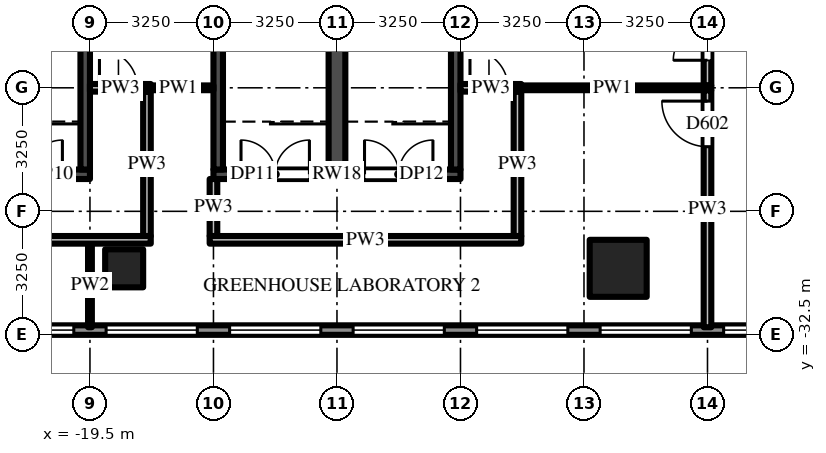
"""IFC4 building model, lengths in metres.
Left out: names, types, materials, properties, quantities, classifications, styles, units other than length and angle.
Written with IfcOpenShell. Run it as: python <this file> out.ifc"""

import sys

from ifc_helpers import new_model, si_unit, direction, frame, frame_2d, origin, origin_2d, place, context, subcontext, project, spatial, rectangle, extrude, source, transform, mapped, element, fill, save


model = new_model("IFC4")
c1 = context("Model", 3, precision=1e-05, world=origin(), true_north=direction((0.0, 1.0)))
c2 = subcontext(c1, "Body", "Model", "MODEL_VIEW")
j1 = project(units=[si_unit("LENGTHUNIT", "METRE"), si_unit("PLANEANGLEUNIT", "RADIAN")], contexts=[c1])
p1 = place(None, origin())
s1 = spatial("IfcSite", under=j1, at=p1, CompositionType="ELEMENT")
p2 = place(p1, origin())
s2 = spatial("IfcBuilding", under=s1, at=p2, CompositionType="ELEMENT")
p3 = place(p2, frame((0.0, 0.0, 29.0)))
s3 = spatial("IfcBuildingStorey", under=s2, at=p3, CompositionType="ELEMENT", Elevation=29.0)
m1 = source(origin(), c2, "Body", "SweptSolid", [
    extrude(rectangle(XDim=1.5, YDim=1.5, at=origin_2d()), origin(), (0.0, 0.0, 1.0), 5.0),
])
p4 = place(p3, frame((-5.6, -30.75, 0.0), z_axis=(0.0, 0.0, 1.0), x_axis=(1.0, 0.0, 0.0)))
e1 = element("IfcColumn", 1, at=p4, inside=s3, PredefinedType="COLUMN", context=c2, shape_type="MappedRepresentation", body=[
    mapped(m1, transform((0.0, 0.0, 0.0))),
])
m2 = source(origin(), c2, "Body", "SweptSolid", [
    extrude(rectangle(XDim=1.0, YDim=1.0, at=origin_2d()), origin(), (0.0, 0.0, 1.0), 5.0),
])
p5 = place(p3, frame((-18.6, -30.75, 0.0), z_axis=(0.0, 0.0, 1.0), x_axis=(1.0, 0.0, 0.0)))
e2 = element("IfcColumn", 2, at=p5, inside=s3, PredefinedType="COLUMN", context=c2, shape_type="MappedRepresentation", body=[
    mapped(m2, transform((0.0, 0.0, 0.0))),
])
m3 = source(origin(), c2, "Body", "SweptSolid", [
    extrude(rectangle(XDim=6.5, YDim=0.25, at=frame_2d((3.25, 0.0))), origin(), (0.0, 0.0, 1.0), 4.65),
])
p6 = place(p3, frame((-26.0, -28.275, 0.0), z_axis=(0.0, 0.0, 1.0), x_axis=(1.0, 0.0, 0.0)))
e3 = element("IfcWall", 3, at=p6, inside=s3, PredefinedType="SHEAR", context=c2, shape_type="MappedRepresentation", body=[
    mapped(m3, transform((0.0, 0.0, 0.0))),
])
m4 = source(origin(), c2, "Body", "SweptSolid", [
    extrude(rectangle(XDim=1.8, YDim=2.1, at=frame_2d((0.9, 1.05))), frame((0.0, 0.135, 0.0), z_axis=(0.0, -1.0, 0.0), x_axis=(1.0, 0.0, 0.0)), (0.0, 0.0, 1.0), 0.27),
])
p7 = place(p6, frame((0.725, 0.0, 0.0)))
e4 = element("IfcOpeningElement", 4, at=p7, cuts=e3, PredefinedType="OPENING", context=c2, shape_type="MappedRepresentation", body=[
    mapped(m4, transform((0.0, 0.0, 0.0))),
])
p8 = place(p6, frame((3.975, 0.0, 0.0)))
e5 = element("IfcOpeningElement", 5, at=p8, cuts=e3, PredefinedType="OPENING", context=c2, shape_type="MappedRepresentation", body=[
    mapped(m4, transform((0.0, 0.0, 0.0))),
])
m5 = source(origin(), c2, "Body", "SweptSolid", [
    extrude(rectangle(XDim=8.3, YDim=0.25, at=frame_2d((4.15, 0.0))), origin(), (0.0, 0.0, 1.0), 4.65),
])
p9 = place(p3, frame((-19.625, -28.15, 0.0), z_axis=(0.0, 0.0, 1.0), x_axis=(0.0, 1.0, 0.0)))
e6 = element("IfcWall", 6, at=p9, inside=s3, PredefinedType="SHEAR", context=c2, shape_type="MappedRepresentation", body=[
    mapped(m5, transform((0.0, 0.0, 0.0))),
])
p10 = place(p3, frame((-16.25, -28.275, 0.0), z_axis=(0.0, 0.0, 1.0), x_axis=(1.0, 0.0, 0.0)))
e7 = element("IfcWall", 7, at=p10, inside=s3, PredefinedType="SHEAR", context=c2, shape_type="MappedRepresentation", body=[
    mapped(m3, transform((0.0, 0.0, 0.0))),
])
p11 = place(p10, frame((0.725, 0.0, 0.0)))
e8 = element("IfcOpeningElement", 8, at=p11, cuts=e7, PredefinedType="OPENING", context=c2, shape_type="MappedRepresentation", body=[
    mapped(m4, transform((0.0, 0.0, 0.0))),
])
p12 = place(p10, frame((3.975, 0.0, 0.0)))
e9 = element("IfcOpeningElement", 9, at=p12, cuts=e7, PredefinedType="OPENING", context=c2, shape_type="MappedRepresentation", body=[
    mapped(m4, transform((0.0, 0.0, 0.0))),
])
for number, where, z_axis, x_axis in (
    (10, (-16.125, -28.15, 0.0), (0.0, 0.0, 1.0), (0.0, 1.0, 0.0)),
    (11, (-9.875, -28.15, 0.0), (0.0, 0.0, 1.0), (0.0, 1.0, 0.0)),
):
    element("IfcWall", number, at=place(p3, frame(where, z_axis=z_axis, x_axis=x_axis)), inside=s3, PredefinedType="SHEAR", context=c2, shape_type="MappedRepresentation", body=[
        mapped(m5, transform((0.0, 0.0, 0.0))),
    ])
m6 = source(origin(), c2, "Body", "SweptSolid", [
    extrude(rectangle(XDim=8.3, YDim=0.44, at=frame_2d((4.15, 0.0))), origin(), (0.0, 0.0, 1.0), 4.65),
])
p13 = place(p3, frame((-13.0, -28.15, 0.0), z_axis=(0.0, 0.0, 1.0), x_axis=(0.0, 1.0, 0.0)))
e12 = element("IfcWall", 12, at=p13, inside=s3, PredefinedType="SHEAR", context=c2, shape_type="MappedRepresentation", body=[
    mapped(m6, transform((0.0, 0.0, 0.0))),
])
m7 = source(origin(), c2, "Body", "SweptSolid", [
    extrude(rectangle(XDim=58.5, YDim=0.25, at=frame_2d((29.25, 0.0))), origin(), (0.0, 0.0, 1.0), 4.65),
])
p14 = place(p3, frame((-29.25, -32.375, 0.0), z_axis=(0.0, 0.0, 1.0), x_axis=(1.0, 0.0, 0.0)))
e13 = element("IfcWall", 13, at=p14, inside=s3, PredefinedType="SOLIDWALL", context=c2, shape_type="MappedRepresentation", body=[
    mapped(m7, transform((0.0, 0.0, 0.0))),
])
m8 = source(origin(), c2, "Body", "SweptSolid", [
    extrude(rectangle(XDim=2.4, YDim=3.3, at=frame_2d((1.2, 1.65))), frame((0.0, 0.135, 0.0), z_axis=(0.0, -1.0, 0.0), x_axis=(1.0, 0.0, 0.0)), (0.0, 0.0, 1.0), 0.27),
])
p15 = place(p14, frame((0.425, 0.0, 0.6)))
e14 = element("IfcOpeningElement", 14, at=p15, cuts=e13, PredefinedType="OPENING", context=c2, shape_type="MappedRepresentation", body=[
    mapped(m8, transform((0.0, 0.0, 0.0))),
])
p16 = place(p14, frame((3.675, 0.0, 0.6)))
e15 = element("IfcOpeningElement", 15, at=p16, cuts=e13, PredefinedType="OPENING", context=c2, shape_type="MappedRepresentation", body=[
    mapped(m8, transform((0.0, 0.0, 0.0))),
])
p17 = place(p14, frame((6.925, 0.0, 0.6)))
e16 = element("IfcOpeningElement", 16, at=p17, cuts=e13, PredefinedType="OPENING", context=c2, shape_type="MappedRepresentation", body=[
    mapped(m8, transform((0.0, 0.0, 0.0))),
])
p18 = place(p14, frame((10.175, 0.0, 0.6)))
e17 = element("IfcOpeningElement", 17, at=p18, cuts=e13, PredefinedType="OPENING", context=c2, shape_type="MappedRepresentation", body=[
    mapped(m8, transform((0.0, 0.0, 0.0))),
])
p19 = place(p14, frame((13.425, 0.0, 0.6)))
e18 = element("IfcOpeningElement", 18, at=p19, cuts=e13, PredefinedType="OPENING", context=c2, shape_type="MappedRepresentation", body=[
    mapped(m8, transform((0.0, 0.0, 0.0))),
])
p20 = place(p14, frame((16.675, 0.0, 0.6)))
e19 = element("IfcOpeningElement", 19, at=p20, cuts=e13, PredefinedType="OPENING", context=c2, shape_type="MappedRepresentation", body=[
    mapped(m8, transform((0.0, 0.0, 0.0))),
])
p21 = place(p14, frame((19.925, 0.0, 0.6)))
e20 = element("IfcOpeningElement", 20, at=p21, cuts=e13, PredefinedType="OPENING", context=c2, shape_type="MappedRepresentation", body=[
    mapped(m8, transform((0.0, 0.0, 0.0))),
])
p22 = place(p14, frame((23.175, 0.0, 0.6)))
e21 = element("IfcOpeningElement", 21, at=p22, cuts=e13, PredefinedType="OPENING", context=c2, shape_type="MappedRepresentation", body=[
    mapped(m8, transform((0.0, 0.0, 0.0))),
])
p23 = place(p14, frame((26.425, 0.0, 0.6)))
e22 = element("IfcOpeningElement", 22, at=p23, cuts=e13, PredefinedType="OPENING", context=c2, shape_type="MappedRepresentation", body=[
    mapped(m8, transform((0.0, 0.0, 0.0))),
])
p24 = place(p14, frame((29.675, 0.0, 0.6)))
e23 = element("IfcOpeningElement", 23, at=p24, cuts=e13, PredefinedType="OPENING", context=c2, shape_type="MappedRepresentation", body=[
    mapped(m8, transform((0.0, 0.0, 0.0))),
])
p25 = place(p14, frame((32.925, 0.0, 0.6)))
e24 = element("IfcOpeningElement", 24, at=p25, cuts=e13, PredefinedType="OPENING", context=c2, shape_type="MappedRepresentation", body=[
    mapped(m8, transform((0.0, 0.0, 0.0))),
])
p26 = place(p14, frame((36.175, 0.0, 0.6)))
e25 = element("IfcOpeningElement", 25, at=p26, cuts=e13, PredefinedType="OPENING", context=c2, shape_type="MappedRepresentation", body=[
    mapped(m8, transform((0.0, 0.0, 0.0))),
])
p27 = place(p14, frame((39.425, 0.0, 0.6)))
e26 = element("IfcOpeningElement", 26, at=p27, cuts=e13, PredefinedType="OPENING", context=c2, shape_type="MappedRepresentation", body=[
    mapped(m8, transform((0.0, 0.0, 0.0))),
])
p28 = place(p14, frame((42.675, 0.0, 0.6)))
e27 = element("IfcOpeningElement", 27, at=p28, cuts=e13, PredefinedType="OPENING", context=c2, shape_type="MappedRepresentation", body=[
    mapped(m8, transform((0.0, 0.0, 0.0))),
])
p29 = place(p14, frame((45.925, 0.0, 0.6)))
e28 = element("IfcOpeningElement", 28, at=p29, cuts=e13, PredefinedType="OPENING", context=c2, shape_type="MappedRepresentation", body=[
    mapped(m8, transform((0.0, 0.0, 0.0))),
])
p30 = place(p14, frame((49.175, 0.0, 0.6)))
e29 = element("IfcOpeningElement", 29, at=p30, cuts=e13, PredefinedType="OPENING", context=c2, shape_type="MappedRepresentation", body=[
    mapped(m8, transform((0.0, 0.0, 0.0))),
])
p31 = place(p14, frame((52.425, 0.0, 0.6)))
e30 = element("IfcOpeningElement", 30, at=p31, cuts=e13, PredefinedType="OPENING", context=c2, shape_type="MappedRepresentation", body=[
    mapped(m8, transform((0.0, 0.0, 0.0))),
])
p32 = place(p14, frame((55.675, 0.0, 0.6)))
e31 = element("IfcOpeningElement", 31, at=p32, cuts=e13, PredefinedType="OPENING", context=c2, shape_type="MappedRepresentation", body=[
    mapped(m8, transform((0.0, 0.0, 0.0))),
])
m9 = source(origin(), c2, "Body", "SweptSolid", [
    extrude(rectangle(XDim=2.2, YDim=0.1, at=frame_2d((1.1, 0.0))), origin(), (0.0, 0.0, 1.0), 3.73),
])
p33 = place(p3, frame((-19.5, -32.3, 0.0), z_axis=(0.0, 0.0, 1.0), x_axis=(0.0, 1.0, 0.0)))
e32 = element("IfcWall", 32, at=p33, inside=s3, PredefinedType="PARTITIONING", context=c2, shape_type="MappedRepresentation", body=[
    mapped(m9, transform((0.0, 0.0, 0.0))),
])
m10 = source(origin(), c2, "Body", "SweptSolid", [
    extrude(rectangle(XDim=3.8, YDim=0.2, at=frame_2d((1.9, 0.0))), origin(), (0.0, 0.0, 1.0), 4.224),
])
p34 = place(p3, frame((-18.0, -26.1, 0.0), z_axis=(0.0, 0.0, 1.0), x_axis=(0.0, -1.0, 0.0)))
e33 = element("IfcWall", 33, at=p34, inside=s3, PredefinedType="PARTITIONING", context=c2, shape_type="MappedRepresentation", body=[
    mapped(m10, transform((0.0, 0.0, 0.0))),
])
m11 = source(origin(), c2, "Body", "SweptSolid", [
    extrude(rectangle(XDim=1.5, YDim=0.2, at=frame_2d((0.75, 0.0))), origin(), (0.0, 0.0, 1.0), 4.65),
])
p35 = place(p3, frame((-16.25, -28.4, 0.0), z_axis=(0.0, 0.0, 1.0), x_axis=(0.0, -1.0, 0.0)))
e34 = element("IfcWall", 34, at=p35, inside=s3, PredefinedType="PARTITIONING", context=c2, shape_type="MappedRepresentation", body=[
    mapped(m11, transform((0.0, 0.0, 0.0))),
])
p36 = place(p3, frame((-8.25, -26.1, 0.0), z_axis=(0.0, 0.0, 1.0), x_axis=(0.0, -1.0, 0.0)))
e35 = element("IfcWall", 35, at=p36, inside=s3, PredefinedType="PARTITIONING", context=c2, shape_type="MappedRepresentation", body=[
    mapped(m10, transform((0.0, 0.0, 0.0))),
])
m12 = source(origin(), c2, "Body", "SweptSolid", [
    extrude(rectangle(XDim=3.188, YDim=0.2, at=frame_2d((1.594, 0.0))), origin(), (0.0, 0.0, 1.0), 4.65),
])
p37 = place(p3, frame((-3.25, -25.938, 0.0), z_axis=(0.0, 0.0, 1.0), x_axis=(0.0, 1.0, 0.0)))
e36 = element("IfcWall", 36, at=p37, inside=s3, PredefinedType="PARTITIONING", context=c2, shape_type="MappedRepresentation", body=[
    mapped(m12, transform((0.0, 0.0, 0.0))),
])
m13 = source(origin(), c2, "Body", "SweptSolid", [
    extrude(rectangle(XDim=1.8, YDim=2.1, at=frame_2d((0.9, 1.05))), frame((0.0, 0.11, 0.0), z_axis=(0.0, -1.0, 0.0), x_axis=(1.0, 0.0, 0.0)), (0.0, 0.0, 1.0), 0.22),
])
p38 = place(p37, frame((0.663, 0.0, 0.0)))
e37 = element("IfcOpeningElement", 37, at=p38, cuts=e36, PredefinedType="OPENING", context=c2, shape_type="MappedRepresentation", body=[
    mapped(m13, transform((0.0, 0.0, 0.0))),
])
m14 = source(origin(), c2, "Body", "SweptSolid", [
    extrude(rectangle(XDim=6.238, YDim=0.2, at=frame_2d((3.119, 0.0))), origin(), (0.0, 0.0, 1.0), 3.73),
])
p39 = place(p3, frame((-3.25, -32.3, 0.0), z_axis=(0.0, 0.0, 1.0), x_axis=(0.0, 1.0, 0.0)))
e38 = element("IfcWall", 38, at=p39, inside=s3, PredefinedType="PARTITIONING", context=c2, shape_type="MappedRepresentation", body=[
    mapped(m14, transform((0.0, 0.0, 0.0))),
])
m15 = source(origin(), c2, "Body", "SweptSolid", [
    extrude(rectangle(XDim=1.2, YDim=2.1, at=frame_2d((0.6, 1.05))), frame((0.0, 0.11, 0.0), z_axis=(0.0, -1.0, 0.0), x_axis=(1.0, 0.0, 0.0)), (0.0, 0.0, 1.0), 0.22),
])
p40 = place(p39, frame((4.75, 0.0, 0.0)))
e39 = element("IfcOpeningElement", 39, at=p40, cuts=e38, PredefinedType="OPENING", context=c2, shape_type="MappedRepresentation", body=[
    mapped(m15, transform((0.0, 0.0, 0.0))),
])
m16 = source(origin(), c2, "Body", "SweptSolid", [
    extrude(rectangle(XDim=8.2, YDim=0.2, at=frame_2d((4.1, 0.0))), origin(), (0.0, 0.0, 1.0), 3.712),
])
p41 = place(p3, frame((-26.1, -30.0, 0.0), z_axis=(0.0, 0.0, 1.0), x_axis=(1.0, 0.0, 0.0)))
e40 = element("IfcWall", 40, at=p41, inside=s3, PredefinedType="PARTITIONING", context=c2, shape_type="MappedRepresentation", body=[
    mapped(m16, transform((0.0, 0.0, 0.0))),
])
m17 = source(origin(), c2, "Body", "SweptSolid", [
    extrude(rectangle(XDim=1.0, YDim=2.1, at=frame_2d((0.5, 1.05))), frame((0.0, 0.11, 0.0), z_axis=(0.0, -1.0, 0.0), x_axis=(1.0, 0.0, 0.0)), (0.0, 0.0, 1.0), 0.22),
])
p42 = place(p41, frame((0.45, 0.0, 0.0)))
e41 = element("IfcOpeningElement", 41, at=p42, cuts=e40, PredefinedType="OPENING", context=c2, shape_type="MappedRepresentation", body=[
    mapped(m17, transform((0.0, 0.0, 0.0))),
])
m18 = source(origin(), c2, "Body", "SweptSolid", [
    extrude(rectangle(XDim=8.2, YDim=0.2, at=frame_2d((4.1, 0.0))), origin(), (0.0, 0.0, 1.0), 4.65),
])
p43 = place(p3, frame((-16.35, -30.0, 0.0), z_axis=(0.0, 0.0, 1.0), x_axis=(1.0, 0.0, 0.0)))
e42 = element("IfcWall", 42, at=p43, inside=s3, PredefinedType="PARTITIONING", context=c2, shape_type="MappedRepresentation", body=[
    mapped(m18, transform((0.0, 0.0, 0.0))),
])
m19 = source(origin(), c2, "Body", "SweptSolid", [
    extrude(rectangle(XDim=1.6, YDim=0.2, at=frame_2d((0.8, 0.0))), origin(), (0.0, 0.0, 1.0), 3.712),
])
p44 = place(p3, frame((-19.5, -26.0, 0.0), z_axis=(0.0, 0.0, 1.0), x_axis=(1.0, 0.0, 0.0)))
e43 = element("IfcWall", 43, at=p44, inside=s3, PredefinedType="PARTITIONING", context=c2, shape_type="MappedRepresentation", body=[
    mapped(m19, transform((0.0, 0.0, 0.0))),
])
p45 = place(p44, frame((0.25, 0.0, 0.0)))
e44 = element("IfcOpeningElement", 44, at=p45, cuts=e43, PredefinedType="OPENING", context=c2, shape_type="MappedRepresentation", body=[
    mapped(m17, transform((0.0, 0.0, 0.0))),
])
m20 = source(origin(), c2, "Body", "SweptSolid", [
    extrude(rectangle(XDim=1.6, YDim=0.2, at=frame_2d((0.8, 0.0))), origin(), (0.0, 0.0, 1.0), 4.65),
])
p46 = place(p3, frame((-9.75, -26.0, 0.0), z_axis=(0.0, 0.0, 1.0), x_axis=(1.0, 0.0, 0.0)))
e45 = element("IfcWall", 45, at=p46, inside=s3, PredefinedType="PARTITIONING", context=c2, shape_type="MappedRepresentation", body=[
    mapped(m20, transform((0.0, 0.0, 0.0))),
])
p47 = place(p46, frame((0.25, 0.0, 0.0)))
e46 = element("IfcOpeningElement", 46, at=p47, cuts=e45, PredefinedType="OPENING", context=c2, shape_type="MappedRepresentation", body=[
    mapped(m17, transform((0.0, 0.0, 0.0))),
])
m21 = source(origin(), c2, "Body", "SweptSolid", [
    extrude(rectangle(XDim=1.85, YDim=0.125, at=frame_2d((0.925, 0.0))), origin(), (0.0, 0.0, 1.0), 4.65),
])
p48 = place(p3, frame((-16.25, -26.0, 0.0), z_axis=(0.0, 0.0, 1.0), x_axis=(-1.0, 0.0, 0.0)))
e47 = element("IfcWall", 47, at=p48, inside=s3, PredefinedType="PARTITIONING", context=c2, shape_type="MappedRepresentation", body=[
    mapped(m21, transform((0.0, 0.0, 0.0))),
])
m22 = source(origin(), c2, "Body", "SweptSolid", [
    extrude(rectangle(XDim=5.2, YDim=0.125, at=frame_2d((2.6, 0.0))), origin(), (0.0, 0.0, 1.0), 2.83),
])
p49 = place(p3, frame((-3.15, -26.0, 0.0), z_axis=(0.0, 0.0, 1.0), x_axis=(-1.0, 0.0, 0.0)))
e48 = element("IfcWall", 48, at=p49, inside=s3, PredefinedType="PARTITIONING", context=c2, shape_type="MappedRepresentation", body=[
    mapped(m22, transform((0.0, 0.0, 0.0))),
])
m23 = source(origin(), c2, "Body", "SweptSolid", [
    extrude(rectangle(XDim=1.8, YDim=2.1, at=frame_2d((0.9, 1.05))), frame((0.0, 0.025, 0.0), z_axis=(0.0, -1.0, 0.0), x_axis=(1.0, 0.0, 0.0)), (0.0, 0.0, 1.0), 0.05),
])
p50 = place(p8, origin())
e49 = element("IfcDoor", 49, at=p50, inside=s3, OperationType="DOUBLE_DOOR_SINGLE_SWING", PredefinedType="DOOR", context=c2, shape_type="MappedRepresentation", body=[
    mapped(m23, transform((0.0, 0.0, 0.0))),
])
fill(e5, e49)
p51 = place(p11, origin())
e50 = element("IfcDoor", 50, at=p51, inside=s3, OperationType="DOUBLE_DOOR_SINGLE_SWING", PredefinedType="DOOR", context=c2, shape_type="MappedRepresentation", body=[
    mapped(m23, transform((0.0, 0.0, 0.0))),
])
fill(e8, e50)
p52 = place(p12, origin())
e51 = element("IfcDoor", 51, at=p52, inside=s3, OperationType="DOUBLE_DOOR_SINGLE_SWING", PredefinedType="DOOR", context=c2, shape_type="MappedRepresentation", body=[
    mapped(m23, transform((0.0, 0.0, 0.0))),
])
fill(e9, e51)
m24 = source(origin(), c2, "Body", "SweptSolid", [
    extrude(rectangle(XDim=2.4, YDim=3.3, at=frame_2d((1.2, 1.65))), frame((0.0, 0.03, 0.0), z_axis=(0.0, -1.0, 0.0), x_axis=(1.0, 0.0, 0.0)), (0.0, 0.0, 1.0), 0.06),
])
p53 = place(p17, origin())
e52 = element("IfcWindow", 52, at=p53, inside=s3, PartitioningType="SINGLE_PANEL", PredefinedType="WINDOW", context=c2, shape_type="MappedRepresentation", body=[
    mapped(m24, transform((0.0, 0.0, 0.0))),
])
fill(e16, e52)
p54 = place(p18, origin())
e53 = element("IfcWindow", 53, at=p54, inside=s3, PartitioningType="SINGLE_PANEL", PredefinedType="WINDOW", context=c2, shape_type="MappedRepresentation", body=[
    mapped(m24, transform((0.0, 0.0, 0.0))),
])
fill(e17, e53)
p55 = place(p19, origin())
e54 = element("IfcWindow", 54, at=p55, inside=s3, PartitioningType="SINGLE_PANEL", PredefinedType="WINDOW", context=c2, shape_type="MappedRepresentation", body=[
    mapped(m24, transform((0.0, 0.0, 0.0))),
])
fill(e18, e54)
p56 = place(p20, origin())
e55 = element("IfcWindow", 55, at=p56, inside=s3, PartitioningType="SINGLE_PANEL", PredefinedType="WINDOW", context=c2, shape_type="MappedRepresentation", body=[
    mapped(m24, transform((0.0, 0.0, 0.0))),
])
fill(e19, e55)
p57 = place(p21, origin())
e56 = element("IfcWindow", 56, at=p57, inside=s3, PartitioningType="SINGLE_PANEL", PredefinedType="WINDOW", context=c2, shape_type="MappedRepresentation", body=[
    mapped(m24, transform((0.0, 0.0, 0.0))),
])
fill(e20, e56)
p58 = place(p22, origin())
e57 = element("IfcWindow", 57, at=p58, inside=s3, PartitioningType="SINGLE_PANEL", PredefinedType="WINDOW", context=c2, shape_type="MappedRepresentation", body=[
    mapped(m24, transform((0.0, 0.0, 0.0))),
])
fill(e21, e57)
p59 = place(p23, origin())
e58 = element("IfcWindow", 58, at=p59, inside=s3, PartitioningType="SINGLE_PANEL", PredefinedType="WINDOW", context=c2, shape_type="MappedRepresentation", body=[
    mapped(m24, transform((0.0, 0.0, 0.0))),
])
fill(e22, e58)
m25 = source(origin(), c2, "Body", "SweptSolid", [
    extrude(rectangle(XDim=1.2, YDim=2.1, at=frame_2d((0.6, 1.05))), frame((0.0, 0.025, 0.0), z_axis=(0.0, -1.0, 0.0), x_axis=(1.0, 0.0, 0.0)), (0.0, 0.0, 1.0), 0.05),
])
p60 = place(p40, origin())
e59 = element("IfcDoor", 59, at=p60, inside=s3, OperationType="SINGLE_SWING_RIGHT", PredefinedType="DOOR", context=c2, shape_type="MappedRepresentation", body=[
    mapped(m25, transform((0.0, 0.0, 0.0))),
])
fill(e39, e59)
m26 = source(origin(), c2, "Body", "SweptSolid", [
    extrude(rectangle(XDim=1.0, YDim=2.1, at=frame_2d((0.5, 1.05))), frame((0.0, 0.025, 0.0), z_axis=(0.0, -1.0, 0.0), x_axis=(1.0, 0.0, 0.0)), (0.0, 0.0, 1.0), 0.05),
])
p61 = place(p45, origin())
e60 = element("IfcDoor", 60, at=p61, inside=s3, OperationType="SINGLE_SWING_LEFT", PredefinedType="DOOR", context=c2, shape_type="MappedRepresentation", body=[
    mapped(m26, transform((0.0, 0.0, 0.0))),
])
fill(e44, e60)
p62 = place(p47, origin())
e61 = element("IfcDoor", 61, at=p62, inside=s3, OperationType="SINGLE_SWING_LEFT", PredefinedType="DOOR", context=c2, shape_type="MappedRepresentation", body=[
    mapped(m26, transform((0.0, 0.0, 0.0))),
])
fill(e46, e61)
p63 = place(p38, origin())
e62 = element("IfcDoor", 62, at=p63, inside=s3, OperationType="DOUBLE_DOOR_SINGLE_SWING", PredefinedType="DOOR", context=c2, shape_type="MappedRepresentation", body=[
    mapped(m23, transform((0.0, 0.0, 0.0))),
])
fill(e37, e62)
save(model, sys.argv[1])
